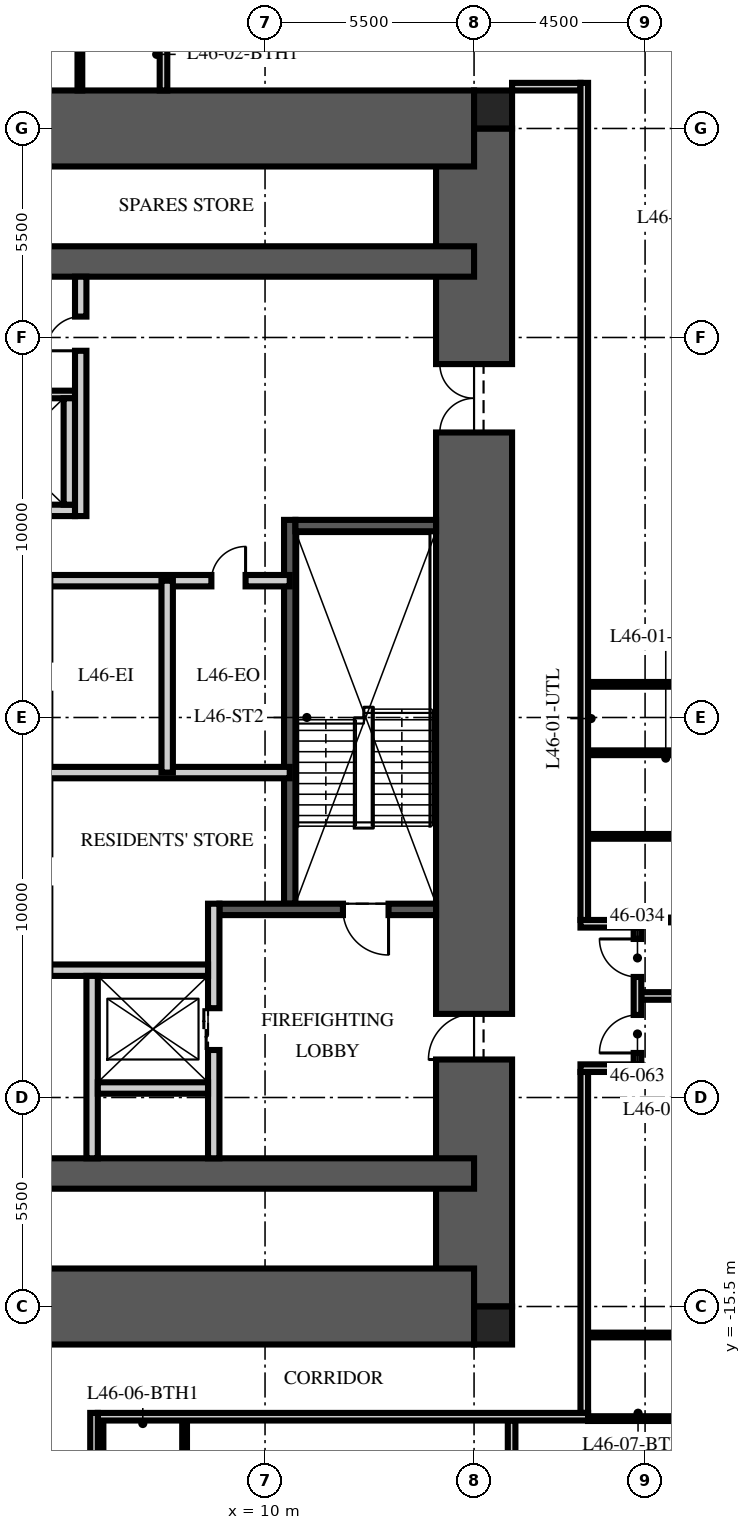
"""IFC4 building model, lengths in metres.
Left out: names, types, materials, properties, quantities, classifications, styles, units other than length and angle.
Written with IfcOpenShell. Run it as: python <this file> out.ifc"""

import sys

from ifc_helpers import new_model, si_unit, direction, frame, frame_2d, origin, origin_2d, place, context, subcontext, project, spatial, rectangle, extrude, element, fill, save


model = new_model("IFC4")
c1 = context("Model", 3, precision=1e-05, world=origin(), true_north=direction((0.0, 1.0)))
c2 = subcontext(c1, "Body", "Model", "MODEL_VIEW")
j1 = project(units=[si_unit("LENGTHUNIT", "METRE"), si_unit("PLANEANGLEUNIT", "RADIAN")], contexts=[c1])
p1 = place(None, origin())
s1 = spatial("IfcSite", under=j1, at=p1, CompositionType="ELEMENT")
p2 = place(p1, origin())
s2 = spatial("IfcBuilding", under=s1, at=p2, CompositionType="ELEMENT")
p3 = place(p2, frame((0.0, 0.0, 182.25)))
s3 = spatial("IfcBuildingStorey", under=s2, at=p3, CompositionType="ELEMENT", Elevation=182.25)
p4 = place(p3, frame((15.5, -15.5, -0.25), z_axis=(0.0, 0.0, 1.0), x_axis=(0.0, 1.0, 0.0)))
e1 = element("IfcWall", 1, at=p4, inside=s3, PredefinedType="SHEAR", context=c2, shape_type="SweptSolid", body=[
    extrude(rectangle(XDim=31.0, YDim=2.0, at=frame_2d((15.5, 0.0))), origin(), (0.0, 0.0, 1.0), 3.7),
])
p5 = place(p4, frame((6.5, 0.0, 0.25)))
e2 = element("IfcOpeningElement", 2, at=p5, cuts=e1, PredefinedType="OPENING", context=c2, shape_type="SweptSolid", body=[
    extrude(rectangle(XDim=1.2, YDim=2.1, at=frame_2d((0.6, 1.05))), frame((0.0, 1.01, 0.0), z_axis=(0.0, -1.0, 0.0), x_axis=(1.0, 0.0, 0.0)), (0.0, 0.0, 1.0), 2.02),
])
p6 = place(p4, frame((23.0, 0.0, 0.25)))
e3 = element("IfcOpeningElement", 3, at=p6, cuts=e1, PredefinedType="OPENING", context=c2, shape_type="SweptSolid", body=[
    extrude(rectangle(XDim=1.8, YDim=2.1, at=frame_2d((0.9, 1.05))), frame((0.0, 1.01, 0.0), z_axis=(0.0, -1.0, 0.0), x_axis=(1.0, 0.0, 0.0)), (0.0, 0.0, 1.0), 2.02),
])
p7 = place(p3, frame((-15.5, 15.5, -0.25), z_axis=(0.0, 0.0, 1.0), x_axis=(1.0, 0.0, 0.0)))
e4 = element("IfcWall", 4, at=p7, inside=s3, PredefinedType="SHEAR", context=c2, shape_type="SweptSolid", body=[
    extrude(rectangle(XDim=31.0, YDim=2.0, at=frame_2d((15.5, 0.0))), origin(), (0.0, 0.0, 1.0), 3.7),
])
p8 = place(p7, frame((5.0, 0.0, 0.25)))
e5 = element("IfcOpeningElement", 5, at=p8, cuts=e4, PredefinedType="OPENING", context=c2, shape_type="SweptSolid", body=[
    extrude(rectangle(XDim=1.0, YDim=2.1, at=frame_2d((0.5, 1.05))), frame((0.0, 1.01, 0.0), z_axis=(0.0, -1.0, 0.0), x_axis=(1.0, 0.0, 0.0)), (0.0, 0.0, 1.0), 2.02),
])
p9 = place(p3, frame((-15.5, -15.5, -0.25), z_axis=(0.0, 0.0, 1.0), x_axis=(1.0, 0.0, 0.0)))
e6 = element("IfcWall", 6, at=p9, inside=s3, PredefinedType="SHEAR", context=c2, shape_type="SweptSolid", body=[
    extrude(rectangle(XDim=31.0, YDim=2.0, at=frame_2d((15.5, 0.0))), origin(), (0.0, 0.0, 1.0), 3.7),
])
p10 = place(p9, frame((10.4, 0.0, 0.25)))
e7 = element("IfcOpeningElement", 7, at=p10, cuts=e6, PredefinedType="OPENING", context=c2, shape_type="SweptSolid", body=[
    extrude(rectangle(XDim=1.1, YDim=2.1, at=frame_2d((0.55, 1.05))), frame((0.0, 1.01, 0.0), z_axis=(0.0, -1.0, 0.0), x_axis=(1.0, 0.0, 0.0)), (0.0, 0.0, 1.0), 2.02),
])
p11 = place(p9, frame((13.5, 0.0, 0.25)))
e8 = element("IfcOpeningElement", 8, at=p11, cuts=e6, PredefinedType="OPENING", context=c2, shape_type="SweptSolid", body=[
    extrude(rectangle(XDim=1.1, YDim=2.1, at=frame_2d((0.55, 1.05))), frame((0.0, 1.01, 0.0), z_axis=(0.0, -1.0, 0.0), x_axis=(1.0, 0.0, 0.0)), (0.0, 0.0, 1.0), 2.02),
])
p12 = place(p9, frame((16.6, 0.0, 0.25)))
e9 = element("IfcOpeningElement", 9, at=p12, cuts=e6, PredefinedType="OPENING", context=c2, shape_type="SweptSolid", body=[
    extrude(rectangle(XDim=1.1, YDim=2.1, at=frame_2d((0.55, 1.05))), frame((0.0, 1.01, 0.0), z_axis=(0.0, -1.0, 0.0), x_axis=(1.0, 0.0, 0.0)), (0.0, 0.0, 1.0), 2.02),
])
for number, where, z_axis, x_axis in (
    (10, (-15.5, 12.0, -0.25), (0.0, 0.0, 1.0), (1.0, 0.0, 0.0)),
    (11, (-15.5, -12.0, -0.25), (0.0, 0.0, 1.0), (1.0, 0.0, 0.0)),
):
    element("IfcWall", number, at=place(p3, frame(where, z_axis=z_axis, x_axis=x_axis)), inside=s3, PredefinedType="SHEAR", context=c2, shape_type="SweptSolid", body=[
        extrude(rectangle(XDim=31.0, YDim=0.8, at=frame_2d((15.5, 0.0))), origin(), (0.0, 0.0, 1.0), 3.7),
    ])
for number, where, z_axis, x_axis in (
    (12, (16.0, 16.0, -0.25), (0.0, 0.0, 1.0), (1.0, 0.0, 0.0)),
    (13, (16.0, -16.0, -0.25), (0.0, 0.0, 1.0), (1.0, 0.0, 0.0)),
):
    element("IfcColumn", number, at=place(p3, frame(where, z_axis=z_axis, x_axis=x_axis)), inside=s3, PredefinedType="COLUMN", context=c2, shape_type="SweptSolid", body=[
        extrude(rectangle(XDim=1.0, YDim=1.0, at=origin_2d()), origin(), (0.0, 0.0, 1.0), 3.7),
    ])
p13 = place(p3, frame((10.65, -4.9, 0.0), z_axis=(0.0, 0.0, 1.0), x_axis=(0.0, 1.0, 0.0)))
e14 = element("IfcWall", 14, at=p13, inside=s3, PredefinedType="SOLIDWALL", context=c2, shape_type="SweptSolid", body=[
    extrude(rectangle(XDim=10.1, YDim=0.3, at=frame_2d((5.05, 0.0))), origin(), (0.0, 0.0, 1.0), 3.45),
])
p14 = place(p3, frame((14.5, -5.05, 0.0), z_axis=(0.0, 0.0, 1.0), x_axis=(-1.0, 0.0, 0.0)))
e15 = element("IfcWall", 15, at=p14, inside=s3, PredefinedType="SOLIDWALL", context=c2, shape_type="SweptSolid", body=[
    extrude(rectangle(XDim=5.7, YDim=0.3, at=frame_2d((2.85, 0.0))), origin(), (0.0, 0.0, 1.0), 3.45),
])
p15 = place(p14, frame((1.25, 0.0, 0.0)))
e16 = element("IfcOpeningElement", 16, at=p15, cuts=e15, PredefinedType="OPENING", context=c2, shape_type="SweptSolid", body=[
    extrude(rectangle(XDim=1.2, YDim=2.1, at=frame_2d((0.6, 1.05))), frame((0.0, 0.16, 0.0), z_axis=(0.0, -1.0, 0.0), x_axis=(1.0, 0.0, 0.0)), (0.0, 0.0, 1.0), 0.32),
])
p16 = place(p3, frame((14.5, 5.05, 0.0), z_axis=(0.0, 0.0, 1.0), x_axis=(-1.0, 0.0, 0.0)))
e17 = element("IfcWall", 17, at=p16, inside=s3, PredefinedType="SOLIDWALL", context=c2, shape_type="SweptSolid", body=[
    extrude(rectangle(XDim=3.7, YDim=0.3, at=frame_2d((1.85, 0.0))), origin(), (0.0, 0.0, 1.0), 3.45),
])
p17 = place(p3, frame((8.65, -11.6, 0.0), z_axis=(0.0, 0.0, 1.0), x_axis=(0.0, 1.0, 0.0)))
e18 = element("IfcWall", 18, at=p17, inside=s3, PredefinedType="PARTITIONING", context=c2, shape_type="SweptSolid", body=[
    extrude(rectangle(XDim=6.7, YDim=0.3, at=frame_2d((3.35, 0.0))), origin(), (0.0, 0.0, 1.0), 3.45),
])
p18 = place(p17, frame((2.85, 0.0, 0.0)))
e19 = element("IfcOpeningElement", 19, at=p18, cuts=e18, PredefinedType="OPENING", context=c2, shape_type="SweptSolid", body=[
    extrude(rectangle(XDim=1.1, YDim=2.1, at=frame_2d((0.55, 1.05))), frame((0.0, 0.16, 0.0), z_axis=(0.0, -1.0, 0.0), x_axis=(1.0, 0.0, 0.0)), (0.0, 0.0, 1.0), 0.32),
])
p19 = place(p3, frame((-8.5, -6.65, 0.0), z_axis=(0.0, 0.0, 1.0), x_axis=(1.0, 0.0, 0.0)))
e20 = element("IfcWall", 20, at=p19, inside=s3, PredefinedType="PARTITIONING", context=c2, shape_type="SweptSolid", body=[
    extrude(rectangle(XDim=17.0, YDim=0.3, at=frame_2d((8.5, 0.0))), origin(), (0.0, 0.0, 1.0), 3.45),
])
p20 = place(p19, frame((7.8, 0.0, 0.0)))
e21 = element("IfcOpeningElement", 21, at=p20, cuts=e20, PredefinedType="OPENING", context=c2, shape_type="SweptSolid", body=[
    extrude(rectangle(XDim=1.3, YDim=2.4, at=frame_2d((0.65, 1.2))), frame((0.0, 0.16, 0.0), z_axis=(0.0, -1.0, 0.0), x_axis=(1.0, 0.0, 0.0)), (0.0, 0.0, 1.0), 0.32),
])
p21 = place(p19, frame((5.65, 0.0, 0.0)))
e22 = element("IfcOpeningElement", 22, at=p21, cuts=e20, PredefinedType="OPENING", context=c2, shape_type="SweptSolid", body=[
    extrude(rectangle(XDim=0.9, YDim=2.1, at=frame_2d((0.45, 1.05))), frame((0.0, 0.16, 0.0), z_axis=(0.0, -1.0, 0.0), x_axis=(1.0, 0.0, 0.0)), (0.0, 0.0, 1.0), 0.32),
])
p22 = place(p19, frame((10.4, 0.0, 0.0)))
e23 = element("IfcOpeningElement", 23, at=p22, cuts=e20, PredefinedType="OPENING", context=c2, shape_type="SweptSolid", body=[
    extrude(rectangle(XDim=0.9, YDim=2.1, at=frame_2d((0.45, 1.05))), frame((0.0, 0.16, 0.0), z_axis=(0.0, -1.0, 0.0), x_axis=(1.0, 0.0, 0.0)), (0.0, 0.0, 1.0), 0.32),
])
p23 = place(p3, frame((5.45, -11.6, 0.0), z_axis=(0.0, 0.0, 1.0), x_axis=(0.0, 1.0, 0.0)))
e24 = element("IfcWall", 24, at=p23, inside=s3, PredefinedType="PARTITIONING", context=c2, shape_type="SweptSolid", body=[
    extrude(rectangle(XDim=4.8, YDim=0.3, at=frame_2d((2.4, 0.0))), origin(), (0.0, 0.0, 1.0), 3.45),
])
p24 = place(p3, frame((5.6, -9.75, 0.0), z_axis=(0.0, 0.0, 1.0), x_axis=(1.0, 0.0, 0.0)))
e25 = element("IfcWall", 25, at=p24, inside=s3, PredefinedType="PARTITIONING", context=c2, shape_type="SweptSolid", body=[
    extrude(rectangle(XDim=2.9, YDim=0.3, at=frame_2d((1.45, 0.0))), origin(), (0.0, 0.0, 1.0), 3.45),
])
p25 = place(p3, frame((-4.7, 5.45, 0.0), z_axis=(0.0, 0.0, 1.0), x_axis=(1.0, 0.0, 0.0)))
e26 = element("IfcWall", 26, at=p25, inside=s3, PredefinedType="PARTITIONING", context=c2, shape_type="SweptSolid", body=[
    extrude(rectangle(XDim=9.7, YDim=0.3, at=frame_2d((4.85, 0.0))), origin(), (0.0, 0.0, 1.0), 3.45),
])
p26 = place(p3, frame((-4.7, 8.5, 0.0), z_axis=(0.0, 0.0, 1.0), x_axis=(1.0, 0.0, 0.0)))
e27 = element("IfcWall", 27, at=p26, inside=s3, PredefinedType="PARTITIONING", context=c2, shape_type="SweptSolid", body=[
    extrude(rectangle(XDim=9.7, YDim=0.2, at=frame_2d((4.85, 0.0))), origin(), (0.0, 0.0, 1.0), 3.45),
])
p27 = place(p3, frame((4.85, 5.6, 0.0), z_axis=(0.0, 0.0, 1.0), x_axis=(0.0, 1.0, 0.0)))
e28 = element("IfcWall", 28, at=p27, inside=s3, PredefinedType="PARTITIONING", context=c2, shape_type="SweptSolid", body=[
    extrude(rectangle(XDim=2.8, YDim=0.3, at=frame_2d((1.4, 0.0))), origin(), (0.0, 0.0, 1.0), 3.45),
])
p28 = place(p3, frame((-10.65, 3.6, 0.0), z_axis=(0.0, 0.0, 1.0), x_axis=(1.0, 0.0, 0.0)))
e29 = element("IfcWall", 29, at=p28, inside=s3, PredefinedType="PARTITIONING", context=c2, shape_type="SweptSolid", body=[
    extrude(rectangle(XDim=21.3, YDim=0.3, at=frame_2d((10.65, 0.0))), origin(), (0.0, 0.0, 1.0), 3.45),
])
p29 = place(p28, frame((10.05, 0.0, 0.0)))
e30 = element("IfcOpeningElement", 30, at=p29, cuts=e29, PredefinedType="OPENING", context=c2, shape_type="SweptSolid", body=[
    extrude(rectangle(XDim=1.2, YDim=2.1, at=frame_2d((0.6, 1.05))), frame((0.0, 0.16, 0.0), z_axis=(0.0, -1.0, 0.0), x_axis=(1.0, 0.0, 0.0)), (0.0, 0.0, 1.0), 0.32),
])
p30 = place(p28, frame((19.238, 0.0, 0.0)))
e31 = element("IfcOpeningElement", 31, at=p30, cuts=e29, PredefinedType="OPENING", context=c2, shape_type="SweptSolid", body=[
    extrude(rectangle(XDim=0.9, YDim=2.1, at=frame_2d((0.45, 1.05))), frame((0.0, 0.16, 0.0), z_axis=(0.0, -1.0, 0.0), x_axis=(1.0, 0.0, 0.0)), (0.0, 0.0, 1.0), 0.32),
])
p31 = place(p3, frame((10.65, -1.45, 0.0), z_axis=(0.0, 0.0, 1.0), x_axis=(-1.0, 0.0, 0.0)))
e32 = element("IfcWall", 32, at=p31, inside=s3, PredefinedType="PARTITIONING", context=c2, shape_type="SweptSolid", body=[
    extrude(rectangle(XDim=6.45, YDim=0.3, at=frame_2d((3.225, 0.0))), origin(), (0.0, 0.0, 1.0), 3.45),
])
p32 = place(p3, frame((7.425, -1.45, 0.0), z_axis=(0.0, 0.0, 1.0), x_axis=(0.0, 1.0, 0.0)))
e33 = element("IfcWall", 33, at=p32, inside=s3, PredefinedType="PARTITIONING", context=c2, shape_type="SweptSolid", body=[
    extrude(rectangle(XDim=5.05, YDim=0.3, at=frame_2d((2.525, 0.0))), origin(), (0.0, 0.0, 1.0), 3.45),
])
p33 = place(p3, frame((5.15, 5.3, 0.0), z_axis=(0.0, 0.0, 1.0), x_axis=(0.0, 1.0, 0.0)))
e34 = element("IfcWall", 34, at=p33, inside=s3, PredefinedType="PARTITIONING", context=c2, shape_type="SweptSolid", body=[
    extrude(rectangle(XDim=6.3, YDim=0.3, at=frame_2d((3.15, 0.0))), origin(), (0.0, 0.0, 1.0), 3.45),
])
p34 = place(p33, frame((4.35, 0.0, 0.0)))
e35 = element("IfcOpeningElement", 35, at=p34, cuts=e34, PredefinedType="OPENING", context=c2, shape_type="SweptSolid", body=[
    extrude(rectangle(XDim=0.9, YDim=2.1, at=frame_2d((0.45, 1.05))), frame((0.0, 0.16, 0.0), z_axis=(0.0, -1.0, 0.0), x_axis=(1.0, 0.0, 0.0)), (0.0, 0.0, 1.0), 0.32),
])
p35 = place(p3, frame((16.5, 16.6, 0.0), z_axis=(0.0, 0.0, 1.0), x_axis=(1.0, 0.0, 0.0)))
e36 = element("IfcWall", 36, at=p35, inside=s3, PredefinedType="PARTITIONING", context=c2, shape_type="SweptSolid", body=[
    extrude(rectangle(XDim=1.8, YDim=0.2, at=frame_2d((0.9, 0.0))), origin(), (0.0, 0.0, 1.0), 2.25),
])
p36 = place(p3, frame((19.9, -7.328, 0.0), z_axis=(0.0, 0.0, 1.0), x_axis=(1.0, 0.0, 0.0)))
e37 = element("IfcWall", 37, at=p36, inside=s3, PredefinedType="PARTITIONING", context=c2, shape_type="SweptSolid", body=[
    extrude(rectangle(XDim=8.25, YDim=0.2, at=frame_2d((4.125, 0.0))), origin(), (0.0, 0.0, 1.0), 2.56),
])
p37 = place(p3, frame((7.328, 16.5, 0.0), z_axis=(0.0, 0.0, 1.0), x_axis=(0.0, 1.0, 0.0)))
e38 = element("IfcWall", 38, at=p37, inside=s3, PredefinedType="PARTITIONING", context=c2, shape_type="SweptSolid", body=[
    extrude(rectangle(XDim=11.65, YDim=0.2, at=frame_2d((5.825, 0.0))), origin(), (0.0, 0.0, 1.0), 2.56),
])
p38 = place(p3, frame((16.488, -18.5, 0.0), z_axis=(0.0, 0.0, 1.0), x_axis=(0.0, -1.0, 0.0)))
e39 = element("IfcWall", 39, at=p38, inside=s3, PredefinedType="PARTITIONING", context=c2, shape_type="SweptSolid", body=[
    extrude(rectangle(XDim=9.65, YDim=0.2, at=frame_2d((4.825, 0.0))), origin(), (0.0, 0.0, 1.0), 2.56),
])
p39 = place(p3, frame((19.97, -5.328, 0.0), z_axis=(0.0, 0.0, 1.0), x_axis=(1.0, 0.0, 0.0)))
e40 = element("IfcWall", 40, at=p39, inside=s3, PredefinedType="PARTITIONING", context=c2, shape_type="SweptSolid", body=[
    extrude(rectangle(XDim=2.06, YDim=0.125, at=frame_2d((1.03, 0.0))), origin(), (0.0, 0.0, 1.0), 3.45),
])
for number, where, z_axis, x_axis in (
    (41, (18.5, -3.128, 0.0), (0.0, 0.0, 1.0), (1.0, 0.0, 0.0)),
    (42, (18.5, -0.928, 0.0), (0.0, 0.0, 1.0), (1.0, 0.0, 0.0)),
    (43, (18.5, 0.872, 0.0), (0.0, 0.0, 1.0), (1.0, 0.0, 0.0)),
):
    element("IfcWall", number, at=place(p3, frame(where, z_axis=z_axis, x_axis=x_axis)), inside=s3, PredefinedType="PARTITIONING", context=c2, shape_type="SweptSolid", body=[
        extrude(rectangle(XDim=3.53, YDim=0.125, at=frame_2d((1.765, 0.0))), origin(), (0.0, 0.0, 1.0), 3.45),
    ])
p40 = place(p3, frame((5.128, 16.5, 0.0), z_axis=(0.0, 0.0, 1.0), x_axis=(0.0, 1.0, 0.0)))
e44 = element("IfcWall", 44, at=p40, inside=s3, PredefinedType="PARTITIONING", context=c2, shape_type="SweptSolid", body=[
    extrude(rectangle(XDim=2.8, YDim=0.125, at=frame_2d((1.4, 0.0))), origin(), (0.0, 0.0, 1.0), 3.45),
])
for number, where, z_axis, x_axis in (
    (45, (5.684, -18.5, 0.0), (0.0, 0.0, 1.0), (0.0, -1.0, 0.0)),
    (46, (7.884, -18.5, 0.0), (0.0, 0.0, 1.0), (0.0, -1.0, 0.0)),
):
    element("IfcWall", number, at=place(p3, frame(where, z_axis=z_axis, x_axis=x_axis)), inside=s3, PredefinedType="PARTITIONING", context=c2, shape_type="SweptSolid", body=[
        extrude(rectangle(XDim=3.53, YDim=0.125, at=frame_2d((1.765, 0.0))), origin(), (0.0, 0.0, 1.0), 3.45),
    ])
p41 = place(p3, frame((18.5, -18.45, 0.0), z_axis=(0.0, 0.0, 1.0), x_axis=(1.0, 0.0, 0.0)))
e47 = element("IfcWall", 47, at=p41, inside=s3, PredefinedType="PARTITIONING", context=c2, shape_type="SweptSolid", body=[
    extrude(rectangle(XDim=3.53, YDim=0.125, at=frame_2d((1.765, 0.0))), origin(), (0.0, 0.0, 1.0), 2.25),
])
p42 = place(p3, frame((18.5, -16.25, 0.0), z_axis=(0.0, 0.0, 1.0), x_axis=(1.0, 0.0, 0.0)))
e48 = element("IfcWall", 48, at=p42, inside=s3, PredefinedType="PARTITIONING", context=c2, shape_type="SweptSolid", body=[
    extrude(rectangle(XDim=3.53, YDim=0.125, at=frame_2d((1.765, 0.0))), origin(), (0.0, 0.0, 1.0), 3.45),
])
p43 = place(p3, frame((18.4, -18.3, 0.0), z_axis=(0.0, 0.0, 1.0), x_axis=(0.0, 1.0, 0.0)))
e49 = element("IfcWall", 49, at=p43, inside=s3, PredefinedType="PARTITIONING", context=c2, shape_type="SweptSolid", body=[
    extrude(rectangle(XDim=8.972, YDim=0.2, at=frame_2d((4.486, 0.0))), origin(), (0.0, 0.0, 1.0), 2.25),
])
p44 = place(p3, frame((18.3, -9.228, 0.0), z_axis=(0.0, 0.0, 1.0), x_axis=(1.0, 0.0, 0.0)))
e50 = element("IfcWall", 50, at=p44, inside=s3, PredefinedType="PARTITIONING", context=c2, shape_type="SweptSolid", body=[
    extrude(rectangle(XDim=1.6, YDim=0.2, at=frame_2d((0.8, 0.0))), origin(), (0.0, 0.0, 1.0), 2.45),
])
p45 = place(p3, frame((18.3, -5.428, 0.0), z_axis=(0.0, 0.0, 1.0), x_axis=(1.0, 0.0, 0.0)))
e51 = element("IfcWall", 51, at=p45, inside=s3, PredefinedType="PARTITIONING", context=c2, shape_type="SweptSolid", body=[
    extrude(rectangle(XDim=1.6, YDim=0.2, at=frame_2d((0.8, 0.0))), origin(), (0.0, 0.0, 1.0), 3.45),
])
p46 = place(p3, frame((19.8, -9.128, 0.0), z_axis=(0.0, 0.0, 1.0), x_axis=(0.0, 1.0, 0.0)))
e52 = element("IfcWall", 52, at=p46, inside=s3, PredefinedType="PARTITIONING", context=c2, shape_type="SweptSolid", body=[
    extrude(rectangle(XDim=3.6, YDim=0.2, at=frame_2d((1.8, 0.0))), origin(), (0.0, 0.0, 1.0), 2.45),
])
p47 = place(p46, frame((2.3, 0.0, 0.0)))
e53 = element("IfcOpeningElement", 53, at=p47, cuts=e52, PredefinedType="OPENING", context=c2, shape_type="SweptSolid", body=[
    extrude(rectangle(XDim=1.0, YDim=2.2, at=frame_2d((0.5, 1.1))), frame((0.0, 0.11, 0.0), z_axis=(0.0, -1.0, 0.0), x_axis=(1.0, 0.0, 0.0)), (0.0, 0.0, 1.0), 0.22),
])
p48 = place(p46, frame((0.3, 0.0, 0.0)))
e54 = element("IfcOpeningElement", 54, at=p48, cuts=e52, PredefinedType="OPENING", context=c2, shape_type="SweptSolid", body=[
    extrude(rectangle(XDim=1.0, YDim=2.2, at=frame_2d((0.5, 1.1))), frame((0.0, 0.11, 0.0), z_axis=(0.0, -1.0, 0.0), x_axis=(1.0, 0.0, 0.0)), (0.0, 0.0, 1.0), 0.22),
])
p49 = place(p3, frame((18.4, -5.328, 0.0), z_axis=(0.0, 0.0, 1.0), x_axis=(0.0, 1.0, 0.0)))
e55 = element("IfcWall", 55, at=p49, inside=s3, PredefinedType="PARTITIONING", context=c2, shape_type="SweptSolid", body=[
    extrude(rectangle(XDim=22.028, YDim=0.2, at=frame_2d((11.014, 0.0))), origin(), (0.0, 0.0, 1.0), 2.45),
])
p50 = place(p3, frame((18.5, -18.4, 0.0), z_axis=(0.0, 0.0, 1.0), x_axis=(-1.0, 0.0, 0.0)))
e56 = element("IfcWall", 56, at=p50, inside=s3, PredefinedType="PARTITIONING", context=c2, shape_type="SweptSolid", body=[
    extrude(rectangle(XDim=12.9, YDim=0.2, at=frame_2d((6.45, 0.0))), origin(), (0.0, 0.0, 1.0), 2.25),
])
p51 = place(p3, frame((5.5, -18.3, 0.0), z_axis=(0.0, 0.0, 1.0), x_axis=(0.0, -1.0, 0.0)))
e57 = element("IfcWall", 57, at=p51, inside=s3, PredefinedType="PARTITIONING", context=c2, shape_type="SweptSolid", body=[
    extrude(rectangle(XDim=3.0, YDim=0.2, at=frame_2d((1.5, 0.0))), origin(), (0.0, 0.0, 1.0), 3.45),
])
p52 = place(p15, origin())
e58 = element("IfcDoor", 58, at=p52, inside=s3, OperationType="SINGLE_SWING_LEFT", PredefinedType="DOOR", context=c2, shape_type="SweptSolid", body=[
    extrude(rectangle(XDim=1.2, YDim=2.1, at=frame_2d((0.6, 1.05))), frame((0.0, 0.025, 0.0), z_axis=(0.0, -1.0, 0.0), x_axis=(1.0, 0.0, 0.0)), (0.0, 0.0, 1.0), 0.05),
])
fill(e16, e58)
p53 = place(p5, origin())
e59 = element("IfcDoor", 59, at=p53, inside=s3, OperationType="SINGLE_SWING_LEFT", PredefinedType="DOOR", context=c2, shape_type="SweptSolid", body=[
    extrude(rectangle(XDim=1.2, YDim=2.1, at=frame_2d((0.6, 1.05))), frame((0.0, 0.025, 0.0), z_axis=(0.0, -1.0, 0.0), x_axis=(1.0, 0.0, 0.0)), (0.0, 0.0, 1.0), 0.05),
])
fill(e2, e59)
p54 = place(p6, origin())
e60 = element("IfcDoor", 60, at=p54, inside=s3, OperationType="DOUBLE_DOOR_SINGLE_SWING", PredefinedType="DOOR", context=c2, shape_type="SweptSolid", body=[
    extrude(rectangle(XDim=1.8, YDim=2.1, at=frame_2d((0.9, 1.05))), frame((0.0, 0.025, 0.0), z_axis=(0.0, -1.0, 0.0), x_axis=(1.0, 0.0, 0.0)), (0.0, 0.0, 1.0), 0.05),
])
fill(e3, e60)
p55 = place(p18, origin())
e61 = element("IfcDoor", 61, at=p55, inside=s3, OperationType="DOUBLE_DOOR_SLIDING", PredefinedType="DOOR", context=c2, shape_type="SweptSolid", body=[
    extrude(rectangle(XDim=1.1, YDim=2.1, at=frame_2d((0.55, 1.05))), frame((0.0, 0.025, 0.0), z_axis=(0.0, -1.0, 0.0), x_axis=(1.0, 0.0, 0.0)), (0.0, 0.0, 1.0), 0.05),
])
fill(e19, e61)
p56 = place(p30, origin())
e62 = element("IfcDoor", 62, at=p56, inside=s3, OperationType="SINGLE_SWING_RIGHT", PredefinedType="DOOR", context=c2, shape_type="SweptSolid", body=[
    extrude(rectangle(XDim=0.9, YDim=2.1, at=frame_2d((0.45, 1.05))), frame((0.0, 0.025, 0.0), z_axis=(0.0, -1.0, 0.0), x_axis=(1.0, 0.0, 0.0)), (0.0, 0.0, 1.0), 0.05),
])
fill(e31, e62)
p57 = place(p34, origin())
e63 = element("IfcDoor", 63, at=p57, inside=s3, OperationType="SINGLE_SWING_LEFT", PredefinedType="DOOR", context=c2, shape_type="SweptSolid", body=[
    extrude(rectangle(XDim=0.9, YDim=2.1, at=frame_2d((0.45, 1.05))), frame((0.0, 0.025, 0.0), z_axis=(0.0, -1.0, 0.0), x_axis=(1.0, 0.0, 0.0)), (0.0, 0.0, 1.0), 0.05),
])
fill(e35, e63)
p58 = place(p47, origin())
e64 = element("IfcDoor", 64, at=p58, inside=s3, OperationType="SINGLE_SWING_RIGHT", PredefinedType="DOOR", context=c2, shape_type="SweptSolid", body=[
    extrude(rectangle(XDim=1.0, YDim=2.2, at=frame_2d((0.5, 1.1))), frame((0.0, 0.025, 0.0), z_axis=(0.0, -1.0, 0.0), x_axis=(1.0, 0.0, 0.0)), (0.0, 0.0, 1.0), 0.05),
])
fill(e53, e64)
p59 = place(p48, origin())
e65 = element("IfcDoor", 65, at=p59, inside=s3, OperationType="SINGLE_SWING_LEFT", PredefinedType="DOOR", context=c2, shape_type="SweptSolid", body=[
    extrude(rectangle(XDim=1.0, YDim=2.2, at=frame_2d((0.5, 1.1))), frame((0.0, 0.025, 0.0), z_axis=(0.0, -1.0, 0.0), x_axis=(1.0, 0.0, 0.0)), (0.0, 0.0, 1.0), 0.05),
])
fill(e54, e65)
save(model, sys.argv[1])
